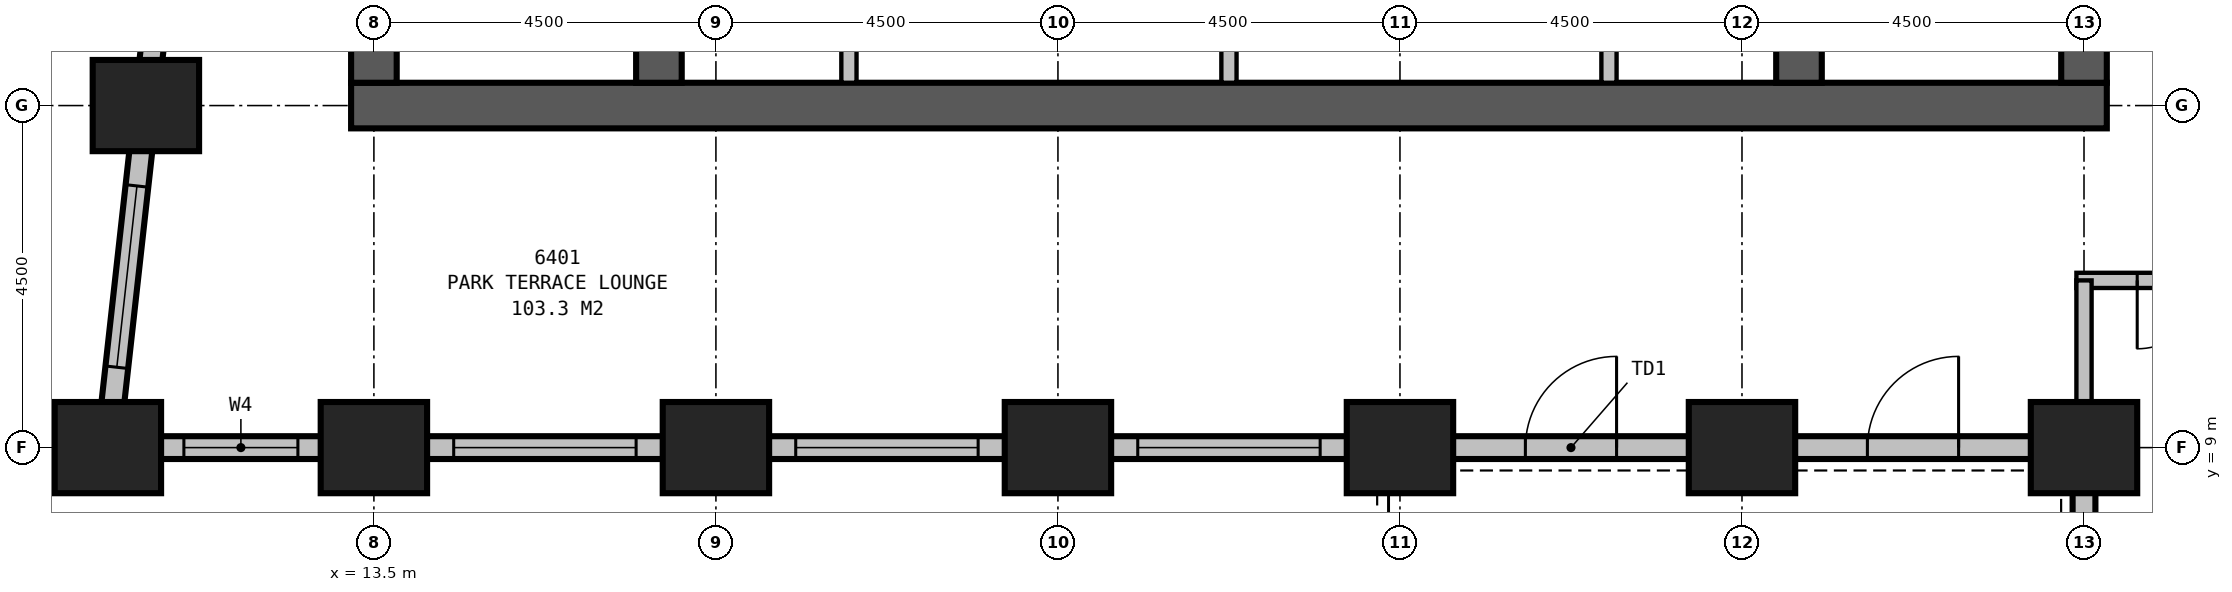
"""IFC4 building model, lengths in metres.
Left out: names, types, materials, properties, quantities, classifications, styles, units other than length and angle.
Written with IfcOpenShell. Run it as: python <this file> out.ifc"""

import sys

from ifc_helpers import new_model, si_unit, direction, frame, frame_2d, origin, origin_2d, place, context, subcontext, project, spatial, rectangle, extrude, element, fill, save


model = new_model("IFC4")
c1 = context("Model", 3, precision=1e-05, world=origin(), true_north=direction((0.0, 1.0)))
c2 = subcontext(c1, "Body", "Model", "MODEL_VIEW")
j1 = project(units=[si_unit("LENGTHUNIT", "METRE"), si_unit("PLANEANGLEUNIT", "RADIAN")], contexts=[c1])
p1 = place(None, origin())
s1 = spatial("IfcSite", under=j1, at=p1, CompositionType="ELEMENT")
p2 = place(p1, origin())
s2 = spatial("IfcBuilding", under=s1, at=p2, CompositionType="ELEMENT")
p3 = place(p2, frame((0.0, 0.0, 250.7)))
s3 = spatial("IfcBuildingStorey", under=s2, at=p3, CompositionType="ELEMENT", Elevation=250.7)
for number, where, z_axis, x_axis in (
    (1, (10.0, 9.0, 0.0), (0.0, 0.0, 1.0), (1.0, 0.0, 0.0)),
    (2, (13.5, 9.0, 0.0), (0.0, 0.0, 1.0), (1.0, 0.0, 0.0)),
    (3, (18.0, 9.0, 0.0), (0.0, 0.0, 1.0), (1.0, 0.0, 0.0)),
    (4, (22.5, 9.0, 0.0), (0.0, 0.0, 1.0), (1.0, 0.0, 0.0)),
    (5, (27.0, 9.0, 0.0), (0.0, 0.0, 1.0), (1.0, 0.0, 0.0)),
    (6, (31.5, 9.0, 0.0), (0.0, 0.0, 1.0), (1.0, 0.0, 0.0)),
    (7, (36.0, 9.0, 0.0), (0.0, 0.0, 1.0), (1.0, 0.0, 0.0)),
    (8, (10.5, 13.5, 0.0), (0.0, 0.0, 1.0), (1.0, 0.0, 0.0)),
):
    element("IfcColumn", number, at=place(p3, frame(where, z_axis=z_axis, x_axis=x_axis)), inside=s3, PredefinedType="COLUMN", context=c2, shape_type="SweptSolid", body=[
        extrude(rectangle(XDim=1.4, YDim=1.2, at=origin_2d()), origin(), (0.0, 0.0, 1.0), 3.9),
    ])
p4 = place(p3, frame((13.2, 13.5, 0.0), z_axis=(0.0, 0.0, 1.0), x_axis=(1.0, 0.0, 0.0)))
e9 = element("IfcWall", 9, at=p4, inside=s3, PredefinedType="SHEAR", context=c2, shape_type="SweptSolid", body=[
    extrude(rectangle(XDim=23.1, YDim=0.6, at=frame_2d((11.55, 0.0))), origin(), (0.0, 0.0, 1.0), 3.9),
])
p5 = place(p3, frame((17.25, 13.8, 0.0), z_axis=(0.0, 0.0, 1.0), x_axis=(0.0, 1.0, 0.0)))
e10 = element("IfcWall", 10, at=p5, inside=s3, PredefinedType="SHEAR", context=c2, shape_type="SweptSolid", body=[
    extrude(rectangle(XDim=12.9, YDim=0.6, at=frame_2d((6.45, 0.0))), origin(), (0.0, 0.0, 1.0), 3.9),
])
p6 = place(p5, frame((3.85, 0.0, 0.0)))
e11 = element("IfcOpeningElement", 11, at=p6, cuts=e10, PredefinedType="OPENING", context=c2, shape_type="SweptSolid", body=[
    extrude(rectangle(XDim=1.2, YDim=2.1, at=frame_2d((0.6, 1.05))), frame((0.0, 0.31, 0.0), z_axis=(0.0, -1.0, 0.0), x_axis=(1.0, 0.0, 0.0)), (0.0, 0.0, 1.0), 0.62),
])
p7 = place(p3, frame((32.25, 13.8, 0.0), z_axis=(0.0, 0.0, 1.0), x_axis=(0.0, 1.0, 0.0)))
e12 = element("IfcWall", 12, at=p7, inside=s3, PredefinedType="SHEAR", context=c2, shape_type="SweptSolid", body=[
    extrude(rectangle(XDim=12.9, YDim=0.6, at=frame_2d((6.45, 0.0))), origin(), (0.0, 0.0, 1.0), 3.9),
])
p8 = place(p7, frame((5.05, 0.0, 0.0), z_axis=(0.0, 0.0, 1.0), x_axis=(-1.0, 0.0, 0.0)))
e13 = element("IfcOpeningElement", 13, at=p8, cuts=e12, PredefinedType="OPENING", context=c2, shape_type="SweptSolid", body=[
    extrude(rectangle(XDim=1.2, YDim=2.1, at=frame_2d((0.6, 1.05))), frame((0.0, 0.31, 0.0), z_axis=(0.0, -1.0, 0.0), x_axis=(1.0, 0.0, 0.0)), (0.0, 0.0, 1.0), 0.62),
])
for number, where, z_axis, x_axis in (
    (14, (13.5, 16.5, 0.0), (0.0, 0.0, 1.0), (0.0, -1.0, 0.0)),
    (15, (36.0, 13.8, 0.0), (0.0, 0.0, 1.0), (0.0, 1.0, 0.0)),
):
    element("IfcWall", number, at=place(p3, frame(where, z_axis=z_axis, x_axis=x_axis)), inside=s3, PredefinedType="SHEAR", context=c2, shape_type="SweptSolid", body=[
        extrude(rectangle(XDim=2.7, YDim=0.6, at=frame_2d((1.35, 0.0))), origin(), (0.0, 0.0, 1.0), 3.9),
    ])
p9 = place(p3, frame((9.85, 9.0, 0.0), z_axis=(0.0, 0.0, 1.0), x_axis=(1.0, 0.0, 0.0)))
e16 = element("IfcWall", 16, at=p9, inside=s3, PredefinedType="STANDARD", context=c2, shape_type="SweptSolid", body=[
    extrude(rectangle(XDim=26.3, YDim=0.3, at=frame_2d((13.15, 0.0))), origin(), (0.0, 0.0, 1.0), 2.65),
])
p10 = place(p9, frame((1.15, 0.0, 0.5)))
e17 = element("IfcOpeningElement", 17, at=p10, cuts=e16, PredefinedType="OPENING", context=c2, shape_type="SweptSolid", body=[
    extrude(rectangle(XDim=1.5, YDim=2.0, at=frame_2d((0.75, 1.0))), frame((0.0, 0.16, 0.0), z_axis=(0.0, -1.0, 0.0), x_axis=(1.0, 0.0, 0.0)), (0.0, 0.0, 1.0), 0.32),
])
p11 = place(p9, frame((4.7, 0.0, 0.5)))
e18 = element("IfcOpeningElement", 18, at=p11, cuts=e16, PredefinedType="OPENING", context=c2, shape_type="SweptSolid", body=[
    extrude(rectangle(XDim=2.4, YDim=2.0, at=frame_2d((1.2, 1.0))), frame((0.0, 0.16, 0.0), z_axis=(0.0, -1.0, 0.0), x_axis=(1.0, 0.0, 0.0)), (0.0, 0.0, 1.0), 0.32),
])
p12 = place(p9, frame((9.2, 0.0, 0.5)))
e19 = element("IfcOpeningElement", 19, at=p12, cuts=e16, PredefinedType="OPENING", context=c2, shape_type="SweptSolid", body=[
    extrude(rectangle(XDim=2.4, YDim=2.0, at=frame_2d((1.2, 1.0))), frame((0.0, 0.16, 0.0), z_axis=(0.0, -1.0, 0.0), x_axis=(1.0, 0.0, 0.0)), (0.0, 0.0, 1.0), 0.32),
])
p13 = place(p9, frame((13.7, 0.0, 0.5)))
e20 = element("IfcOpeningElement", 20, at=p13, cuts=e16, PredefinedType="OPENING", context=c2, shape_type="SweptSolid", body=[
    extrude(rectangle(XDim=2.4, YDim=2.0, at=frame_2d((1.2, 1.0))), frame((0.0, 0.16, 0.0), z_axis=(0.0, -1.0, 0.0), x_axis=(1.0, 0.0, 0.0)), (0.0, 0.0, 1.0), 0.32),
])
p14 = place(p9, frame((18.8, 0.0, 0.0)))
e21 = element("IfcOpeningElement", 21, at=p14, cuts=e16, PredefinedType="OPENING", context=c2, shape_type="SweptSolid", body=[
    extrude(rectangle(XDim=1.2, YDim=2.4, at=frame_2d((0.6, 1.2))), frame((0.0, 0.16, 0.0), z_axis=(0.0, -1.0, 0.0), x_axis=(1.0, 0.0, 0.0)), (0.0, 0.0, 1.0), 0.32),
])
p15 = place(p9, frame((23.3, 0.0, 0.0)))
e22 = element("IfcOpeningElement", 22, at=p15, cuts=e16, PredefinedType="OPENING", context=c2, shape_type="SweptSolid", body=[
    extrude(rectangle(XDim=1.2, YDim=2.4, at=frame_2d((0.6, 1.2))), frame((0.0, 0.16, 0.0), z_axis=(0.0, -1.0, 0.0), x_axis=(1.0, 0.0, 0.0)), (0.0, 0.0, 1.0), 0.32),
])
p16 = place(p3, frame((36.0, 9.15, 0.0), z_axis=(0.0, 0.0, 1.0), x_axis=(0.0, -1.0, 0.0)))
e23 = element("IfcWall", 23, at=p16, inside=s3, PredefinedType="STANDARD", context=c2, shape_type="SweptSolid", body=[
    extrude(rectangle(XDim=9.3, YDim=0.3, at=frame_2d((4.65, 0.0))), origin(), (0.0, 0.0, 1.0), 2.65),
])
p17 = place(p16, frame((1.2, 0.0, 0.5)))
e24 = element("IfcOpeningElement", 24, at=p17, cuts=e23, PredefinedType="OPENING", context=c2, shape_type="SweptSolid", body=[
    extrude(rectangle(XDim=2.4, YDim=2.0, at=frame_2d((1.2, 1.0))), frame((0.0, 0.16, 0.0), z_axis=(0.0, -1.0, 0.0), x_axis=(1.0, 0.0, 0.0)), (0.0, 0.0, 1.0), 0.32),
])
p18 = place(p3, frame((13.517, 40.649, 0.0), z_axis=(0.0, 0.0, 1.0), x_axis=(-0.110433201132, -0.993883548555, 0.0)))
e25 = element("IfcWall", 25, at=p18, inside=s3, PredefinedType="STANDARD", context=c2, shape_type="SweptSolid", body=[
    extrude(rectangle(XDim=31.994, YDim=0.3, at=frame_2d((15.997, 0.0))), origin(), (0.0, 0.0, 1.0), 2.65),
])
p19 = place(p18, frame((1.214, 0.0, 0.5)))
e26 = element("IfcOpeningElement", 26, at=p19, cuts=e25, PredefinedType="OPENING", context=c2, shape_type="SweptSolid", body=[
    extrude(rectangle(XDim=2.4, YDim=2.0, at=frame_2d((1.2, 1.0))), frame((0.0, 0.16, 0.0), z_axis=(0.0, -1.0, 0.0), x_axis=(1.0, 0.0, 0.0)), (0.0, 0.0, 1.0), 0.32),
])
p20 = place(p18, frame((5.742, 0.0, 0.5)))
e27 = element("IfcOpeningElement", 27, at=p20, cuts=e25, PredefinedType="OPENING", context=c2, shape_type="SweptSolid", body=[
    extrude(rectangle(XDim=2.4, YDim=2.0, at=frame_2d((1.2, 1.0))), frame((0.0, 0.16, 0.0), z_axis=(0.0, -1.0, 0.0), x_axis=(1.0, 0.0, 0.0)), (0.0, 0.0, 1.0), 0.32),
])
p21 = place(p18, frame((14.797, 0.0, 0.5)))
e28 = element("IfcOpeningElement", 28, at=p21, cuts=e25, PredefinedType="OPENING", context=c2, shape_type="SweptSolid", body=[
    extrude(rectangle(XDim=2.4, YDim=2.0, at=frame_2d((1.2, 1.0))), frame((0.0, 0.16, 0.0), z_axis=(0.0, -1.0, 0.0), x_axis=(1.0, 0.0, 0.0)), (0.0, 0.0, 1.0), 0.32),
])
p22 = place(p18, frame((19.325, 0.0, 0.5)))
e29 = element("IfcOpeningElement", 29, at=p22, cuts=e25, PredefinedType="OPENING", context=c2, shape_type="SweptSolid", body=[
    extrude(rectangle(XDim=2.4, YDim=2.0, at=frame_2d((1.2, 1.0))), frame((0.0, 0.16, 0.0), z_axis=(0.0, -1.0, 0.0), x_axis=(1.0, 0.0, 0.0)), (0.0, 0.0, 1.0), 0.32),
])
p23 = place(p18, frame((23.852, 0.0, 0.5)))
e30 = element("IfcOpeningElement", 30, at=p23, cuts=e25, PredefinedType="OPENING", context=c2, shape_type="SweptSolid", body=[
    extrude(rectangle(XDim=2.4, YDim=2.0, at=frame_2d((1.2, 1.0))), frame((0.0, 0.16, 0.0), z_axis=(0.0, -1.0, 0.0), x_axis=(1.0, 0.0, 0.0)), (0.0, 0.0, 1.0), 0.32),
])
p24 = place(p18, frame((28.38, 0.0, 0.5)))
e31 = element("IfcOpeningElement", 31, at=p24, cuts=e25, PredefinedType="OPENING", context=c2, shape_type="SweptSolid", body=[
    extrude(rectangle(XDim=2.4, YDim=2.0, at=frame_2d((1.2, 1.0))), frame((0.0, 0.16, 0.0), z_axis=(0.0, -1.0, 0.0), x_axis=(1.0, 0.0, 0.0)), (0.0, 0.0, 1.0), 0.32),
])
p25 = place(p3, frame((35.9, 11.2, 0.0), z_axis=(0.0, 0.0, 1.0), x_axis=(1.0, 0.0, 0.0)))
e32 = element("IfcWall", 32, at=p25, inside=s3, PredefinedType="PARTITIONING", context=c2, shape_type="SweptSolid", body=[
    extrude(rectangle(XDim=2.4, YDim=0.2, at=frame_2d((1.2, 0.0))), origin(), (0.0, 0.0, 1.0), 3.65),
])
p26 = place(p25, frame((1.7, 0.0, 0.0), z_axis=(0.0, 0.0, 1.0), x_axis=(-1.0, 0.0, 0.0)))
e33 = element("IfcOpeningElement", 33, at=p26, cuts=e32, PredefinedType="OPENING", context=c2, shape_type="SweptSolid", body=[
    extrude(rectangle(XDim=0.9, YDim=2.1, at=frame_2d((0.45, 1.05))), frame((0.0, 0.11, 0.0), z_axis=(0.0, -1.0, 0.0), x_axis=(1.0, 0.0, 0.0)), (0.0, 0.0, 1.0), 0.22),
])
p27 = place(p3, frame((36.0, 11.2, 0.0), z_axis=(0.0, 0.0, 1.0), x_axis=(0.0, -1.0, 0.0)))
e34 = element("IfcWall", 34, at=p27, inside=s3, PredefinedType="PARTITIONING", context=c2, shape_type="SweptSolid", body=[
    extrude(rectangle(XDim=2.05, YDim=0.2, at=frame_2d((1.025, 0.0))), origin(), (0.0, 0.0, 1.0), 2.65),
])
for number, where, z_axis, x_axis in (
    (35, (19.75, 13.8, 0.0), (0.0, 0.0, 1.0), (0.0, 1.0, 0.0)),
    (36, (24.75, 13.8, 0.0), (0.0, 0.0, 1.0), (0.0, 1.0, 0.0)),
    (37, (29.75, 13.8, 0.0), (0.0, 0.0, 1.0), (0.0, 1.0, 0.0)),
):
    element("IfcWall", number, at=place(p3, frame(where, z_axis=z_axis, x_axis=x_axis)), inside=s3, PredefinedType="PARTITIONING", context=c2, shape_type="SweptSolid", body=[
        extrude(rectangle(XDim=2.4, YDim=0.2, at=frame_2d((1.2, 0.0))), origin(), (0.0, 0.0, 1.0), 3.65),
    ])
p28 = place(p10, origin())
e38 = element("IfcWindow", 38, at=p28, inside=s3, PartitioningType="SINGLE_PANEL", PredefinedType="WINDOW", context=c2, shape_type="SweptSolid", body=[
    extrude(rectangle(XDim=1.5, YDim=2.0, at=frame_2d((0.75, 1.0))), frame((0.0, 0.03, 0.0), z_axis=(0.0, -1.0, 0.0), x_axis=(1.0, 0.0, 0.0)), (0.0, 0.0, 1.0), 0.06),
])
fill(e17, e38)
p29 = place(p11, origin())
e39 = element("IfcWindow", 39, at=p29, inside=s3, PartitioningType="SINGLE_PANEL", PredefinedType="WINDOW", context=c2, shape_type="SweptSolid", body=[
    extrude(rectangle(XDim=2.4, YDim=2.0, at=frame_2d((1.2, 1.0))), frame((0.0, 0.03, 0.0), z_axis=(0.0, -1.0, 0.0), x_axis=(1.0, 0.0, 0.0)), (0.0, 0.0, 1.0), 0.06),
])
fill(e18, e39)
p30 = place(p12, origin())
e40 = element("IfcWindow", 40, at=p30, inside=s3, PartitioningType="SINGLE_PANEL", PredefinedType="WINDOW", context=c2, shape_type="SweptSolid", body=[
    extrude(rectangle(XDim=2.4, YDim=2.0, at=frame_2d((1.2, 1.0))), frame((0.0, 0.03, 0.0), z_axis=(0.0, -1.0, 0.0), x_axis=(1.0, 0.0, 0.0)), (0.0, 0.0, 1.0), 0.06),
])
fill(e19, e40)
p31 = place(p13, origin())
e41 = element("IfcWindow", 41, at=p31, inside=s3, PartitioningType="SINGLE_PANEL", PredefinedType="WINDOW", context=c2, shape_type="SweptSolid", body=[
    extrude(rectangle(XDim=2.4, YDim=2.0, at=frame_2d((1.2, 1.0))), frame((0.0, 0.03, 0.0), z_axis=(0.0, -1.0, 0.0), x_axis=(1.0, 0.0, 0.0)), (0.0, 0.0, 1.0), 0.06),
])
fill(e20, e41)
p32 = place(p14, origin())
e42 = element("IfcDoor", 42, at=p32, inside=s3, OperationType="SINGLE_SWING_RIGHT", PredefinedType="DOOR", context=c2, shape_type="SweptSolid", body=[
    extrude(rectangle(XDim=1.2, YDim=2.4, at=frame_2d((0.6, 1.2))), frame((0.0, 0.025, 0.0), z_axis=(0.0, -1.0, 0.0), x_axis=(1.0, 0.0, 0.0)), (0.0, 0.0, 1.0), 0.05),
])
fill(e21, e42)
p33 = place(p15, origin())
e43 = element("IfcDoor", 43, at=p33, inside=s3, OperationType="SINGLE_SWING_RIGHT", PredefinedType="DOOR", context=c2, shape_type="SweptSolid", body=[
    extrude(rectangle(XDim=1.2, YDim=2.4, at=frame_2d((0.6, 1.2))), frame((0.0, 0.025, 0.0), z_axis=(0.0, -1.0, 0.0), x_axis=(1.0, 0.0, 0.0)), (0.0, 0.0, 1.0), 0.05),
])
fill(e22, e43)
p34 = place(p24, origin())
e44 = element("IfcWindow", 44, at=p34, inside=s3, PartitioningType="SINGLE_PANEL", PredefinedType="WINDOW", context=c2, shape_type="SweptSolid", body=[
    extrude(rectangle(XDim=2.4, YDim=2.0, at=frame_2d((1.2, 1.0))), frame((0.0, 0.03, 0.0), z_axis=(0.0, -1.0, 0.0), x_axis=(1.0, 0.0, 0.0)), (0.0, 0.0, 1.0), 0.06),
])
fill(e31, e44)
p35 = place(p26, origin())
e45 = element("IfcDoor", 45, at=p35, inside=s3, OperationType="SINGLE_SWING_RIGHT", PredefinedType="DOOR", context=c2, shape_type="SweptSolid", body=[
    extrude(rectangle(XDim=0.9, YDim=2.1, at=frame_2d((0.45, 1.05))), frame((0.0, 0.025, 0.0), z_axis=(0.0, -1.0, 0.0), x_axis=(1.0, 0.0, 0.0)), (0.0, 0.0, 1.0), 0.05),
])
fill(e33, e45)
save(model, sys.argv[1])
